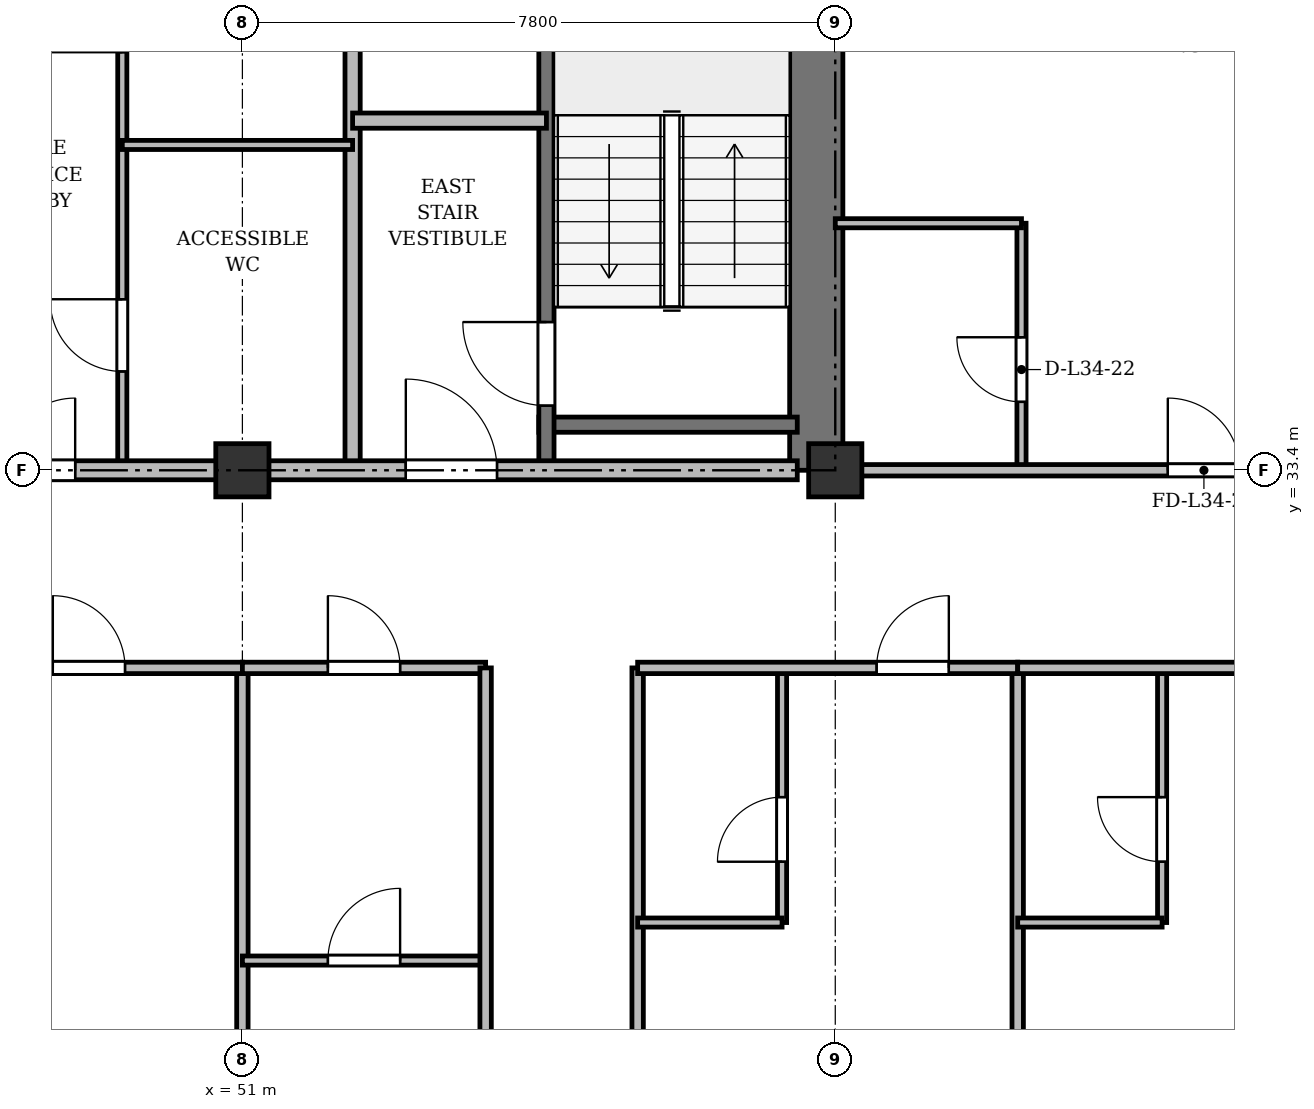
"""IFC4 building model, lengths in metres.
Left out: names, types, materials, properties, quantities, classifications, styles, units other than length and angle.
Written with IfcOpenShell. Run it as: python <this file> out.ifc"""

import sys

from ifc_helpers import new_model, si_unit, direction, frame, frame_2d, origin, origin_2d, place, context, subcontext, project, spatial, rectangle, extrude, source, transform, mapped, element, fill, save


model = new_model("IFC4")
c1 = context("Model", 3, precision=1e-05, world=origin(), true_north=direction((0.0, 1.0)))
c2 = subcontext(c1, "Body", "Model", "MODEL_VIEW")
j1 = project(units=[si_unit("LENGTHUNIT", "METRE"), si_unit("PLANEANGLEUNIT", "RADIAN")], contexts=[c1])
p1 = place(None, origin())
s1 = spatial("IfcSite", under=j1, at=p1, CompositionType="ELEMENT")
p2 = place(p1, origin())
s2 = spatial("IfcBuilding", under=s1, at=p2, CompositionType="ELEMENT")
p3 = place(p2, frame((0.0, 0.0, 132.1)))
s3 = spatial("IfcBuildingStorey", under=s2, at=p3, CompositionType="ELEMENT", Elevation=132.1)
m1 = source(origin(), c2, "Body", "SweptSolid", [
    extrude(rectangle(XDim=0.7, YDim=0.7, at=origin_2d()), origin(), (0.0, 0.0, 1.0), 3.6),
])
for number, where, z_axis, x_axis in (
    (1, (51.0, 33.4, 0.0), (0.0, 0.0, 1.0), (1.0, 0.0, 0.0)),
    (2, (58.8, 33.4, 0.0), (0.0, 0.0, 1.0), (1.0, 0.0, 0.0)),
):
    element("IfcColumn", number, at=place(p3, frame(where, z_axis=z_axis, x_axis=x_axis)), inside=s3, PredefinedType="COLUMN", context=c2, shape_type="MappedRepresentation", body=[
        mapped(m1, transform((0.0, 0.0, 0.0), x_axis=(1.0, 0.0, 0.0), y_axis=(0.0, 1.0, 0.0), z_axis=(0.0, 0.0, 1.0), scale=1.0)),
    ])
p4 = place(p3, frame((58.55, 33.4, 0.0), z_axis=(0.0, 0.0, 1.0), x_axis=(0.0, 1.0, 0.0)))
e3 = element("IfcWall", 3, at=p4, inside=s3, PredefinedType="SHEAR", context=c2, shape_type="SweptSolid", body=[
    extrude(rectangle(XDim=11.7, YDim=0.7, at=frame_2d((5.85, 0.0))), origin(), (0.0, 0.0, 1.0), 3.35),
])
p5 = place(p3, frame((54.9, 34.0, 0.0), z_axis=(0.0, 0.0, 1.0), x_axis=(1.0, 0.0, 0.0)))
e4 = element("IfcWall", 4, at=p5, inside=s3, PredefinedType="SHEAR", context=c2, shape_type="SweptSolid", body=[
    extrude(rectangle(XDim=3.4, YDim=0.2, at=frame_2d((1.7, 0.0))), origin(), (0.0, 0.0, 1.0), 3.35),
])
p6 = place(p3, frame((55.0, 33.4, 0.0), z_axis=(0.0, 0.0, 1.0), x_axis=(0.0, 1.0, 0.0)))
e5 = element("IfcWall", 5, at=p6, inside=s3, PredefinedType="SHEAR", context=c2, shape_type="SweptSolid", body=[
    extrude(rectangle(XDim=11.1, YDim=0.2, at=frame_2d((5.55, 0.0))), origin(), (0.0, 0.0, 1.0), 3.35),
])
p7 = place(p6, frame((0.85, 0.0, 0.0)))
e6 = element("IfcOpeningElement", 6, at=p7, cuts=e5, PredefinedType="OPENING", context=c2, shape_type="SweptSolid", body=[
    extrude(rectangle(XDim=1.1, YDim=2.15, at=frame_2d((0.55, 1.075))), frame((0.0, 0.11, 0.0), z_axis=(0.0, -1.0, 0.0), x_axis=(1.0, 0.0, 0.0)), (0.0, 0.0, 1.0), 0.22),
])
p8 = place(p3, frame((52.45, 33.4, 0.0), z_axis=(0.0, 0.0, 1.0), x_axis=(0.0, 1.0, 0.0)))
e7 = element("IfcWall", 7, at=p8, inside=s3, PredefinedType="PARTITIONING", context=c2, shape_type="SweptSolid", body=[
    extrude(rectangle(XDim=8.65, YDim=0.2, at=frame_2d((4.325, 0.0))), origin(), (0.0, 0.0, 1.0), 2.75),
])
p9 = place(p8, frame((6.2, 0.0, 0.0)))
e8 = element("IfcOpeningElement", 8, at=p9, cuts=e7, PredefinedType="OPENING", context=c2, shape_type="SweptSolid", body=[
    extrude(rectangle(XDim=0.95, YDim=2.15, at=frame_2d((0.475, 1.075))), frame((0.0, 0.11, 0.0), z_axis=(0.0, -1.0, 0.0), x_axis=(1.0, 0.0, 0.0)), (0.0, 0.0, 1.0), 0.22),
])
p10 = place(p3, frame((52.45, 38.0, 0.0), z_axis=(0.0, 0.0, 1.0), x_axis=(1.0, 0.0, 0.0)))
e9 = element("IfcWall", 9, at=p10, inside=s3, PredefinedType="PARTITIONING", context=c2, shape_type="SweptSolid", body=[
    extrude(rectangle(XDim=2.55, YDim=0.2, at=frame_2d((1.275, 0.0))), origin(), (0.0, 0.0, 1.0), 3.35),
])
p11 = place(p3, frame((49.42, 33.4, 0.0), z_axis=(0.0, 0.0, 1.0), x_axis=(0.0, 1.0, 0.0)))
e10 = element("IfcWall", 10, at=p11, inside=s3, PredefinedType="PARTITIONING", context=c2, shape_type="SweptSolid", body=[
    extrude(rectangle(XDim=8.6, YDim=0.12, at=frame_2d((4.3, 0.0))), origin(), (0.0, 0.0, 1.0), 2.75),
])
p12 = place(p11, frame((1.3, 0.0, 0.0)))
e11 = element("IfcOpeningElement", 11, at=p12, cuts=e10, PredefinedType="OPENING", context=c2, shape_type="SweptSolid", body=[
    extrude(rectangle(XDim=0.95, YDim=2.15, at=frame_2d((0.475, 1.075))), frame((0.0, 0.07, 0.0), z_axis=(0.0, -1.0, 0.0), x_axis=(1.0, 0.0, 0.0)), (0.0, 0.0, 1.0), 0.14),
])
p13 = place(p11, frame((5.5, 0.0, 0.0)))
e12 = element("IfcOpeningElement", 12, at=p13, cuts=e10, PredefinedType="OPENING", context=c2, shape_type="SweptSolid", body=[
    extrude(rectangle(XDim=0.95, YDim=2.15, at=frame_2d((0.475, 1.075))), frame((0.0, 0.07, 0.0), z_axis=(0.0, -1.0, 0.0), x_axis=(1.0, 0.0, 0.0)), (0.0, 0.0, 1.0), 0.14),
])
p14 = place(p3, frame((49.42, 37.68, 0.0), z_axis=(0.0, 0.0, 1.0), x_axis=(1.0, 0.0, 0.0)))
e13 = element("IfcWall", 13, at=p14, inside=s3, PredefinedType="PARTITIONING", context=c2, shape_type="SweptSolid", body=[
    extrude(rectangle(XDim=3.03, YDim=0.12, at=frame_2d((1.515, 0.0))), origin(), (0.0, 0.0, 1.0), 2.85),
])
p15 = place(p3, frame((47.15, 33.4, 0.0), z_axis=(0.0, 0.0, 1.0), x_axis=(1.0, 0.0, 0.0)))
e14 = element("IfcWall", 14, at=p15, inside=s3, PredefinedType="PARTITIONING", context=c2, shape_type="SweptSolid", body=[
    extrude(rectangle(XDim=11.15, YDim=0.25, at=frame_2d((5.575, 0.0))), origin(), (0.0, 0.0, 1.0), 2.75),
])
p16 = place(p15, frame((0.7, 0.0, 0.0)))
e15 = element("IfcOpeningElement", 15, at=p16, cuts=e14, PredefinedType="OPENING", context=c2, shape_type="SweptSolid", body=[
    extrude(rectangle(XDim=0.95, YDim=2.15, at=frame_2d((0.475, 1.075))), frame((0.0, 0.135, 0.0), z_axis=(0.0, -1.0, 0.0), x_axis=(1.0, 0.0, 0.0)), (0.0, 0.0, 1.0), 0.27),
])
p17 = place(p15, frame((6.0, 0.0, 0.0)))
e16 = element("IfcOpeningElement", 16, at=p17, cuts=e14, PredefinedType="OPENING", context=c2, shape_type="SweptSolid", body=[
    extrude(rectangle(XDim=1.2, YDim=2.15, at=frame_2d((0.6, 1.075))), frame((0.0, 0.135, 0.0), z_axis=(0.0, -1.0, 0.0), x_axis=(1.0, 0.0, 0.0)), (0.0, 0.0, 1.0), 0.27),
])
p18 = place(p3, frame((61.25, 33.4, 0.0), z_axis=(0.0, 0.0, 1.0), x_axis=(0.0, 1.0, 0.0)))
e17 = element("IfcWall", 17, at=p18, inside=s3, PredefinedType="PARTITIONING", context=c2, shape_type="SweptSolid", body=[
    extrude(rectangle(XDim=3.25, YDim=0.12, at=frame_2d((1.625, 0.0))), origin(), (0.0, 0.0, 1.0), 2.75),
])
p19 = place(p18, frame((0.9, 0.0, 0.0)))
e18 = element("IfcOpeningElement", 18, at=p19, cuts=e17, PredefinedType="OPENING", context=c2, shape_type="SweptSolid", body=[
    extrude(rectangle(XDim=0.85, YDim=2.1, at=frame_2d((0.425, 1.05))), frame((0.0, 0.07, 0.0), z_axis=(0.0, -1.0, 0.0), x_axis=(1.0, 0.0, 0.0)), (0.0, 0.0, 1.0), 0.14),
])
p20 = place(p3, frame((58.8, 36.65, 0.0), z_axis=(0.0, 0.0, 1.0), x_axis=(1.0, 0.0, 0.0)))
e19 = element("IfcWall", 19, at=p20, inside=s3, PredefinedType="PARTITIONING", context=c2, shape_type="SweptSolid", body=[
    extrude(rectangle(XDim=2.45, YDim=0.12, at=frame_2d((1.225, 0.0))), origin(), (0.0, 0.0, 1.0), 2.85),
])
p21 = place(p3, frame((58.8, 33.4, 0.0), z_axis=(0.0, 0.0, 1.0), x_axis=(1.0, 0.0, 0.0)))
e20 = element("IfcWall", 20, at=p21, inside=s3, PredefinedType="PARTITIONING", context=c2, shape_type="SweptSolid", body=[
    extrude(rectangle(XDim=7.55, YDim=0.15, at=frame_2d((3.775, 0.0))), origin(), (0.0, 0.0, 1.0), 2.75),
])
p22 = place(p21, frame((4.375, 0.0, 0.0)))
e21 = element("IfcOpeningElement", 21, at=p22, cuts=e20, PredefinedType="OPENING", context=c2, shape_type="SweptSolid", body=[
    extrude(rectangle(XDim=0.95, YDim=2.15, at=frame_2d((0.475, 1.075))), frame((0.0, 0.085, 0.0), z_axis=(0.0, -1.0, 0.0), x_axis=(1.0, 0.0, 0.0)), (0.0, 0.0, 1.0), 0.17),
])
p23 = place(p3, frame((51.0, 3.525, 0.0), z_axis=(0.0, 0.0, 1.0), x_axis=(0.0, 1.0, 0.0)))
e22 = element("IfcWall", 22, at=p23, inside=s3, PredefinedType="PARTITIONING", context=c2, shape_type="SweptSolid", body=[
    extrude(rectangle(XDim=27.275, YDim=0.15, at=frame_2d((13.638, 0.0))), origin(), (0.0, 0.0, 1.0), 2.85),
])
p24 = place(p3, frame((61.2, 3.525, 0.0), z_axis=(0.0, 0.0, 1.0), x_axis=(0.0, 1.0, 0.0)))
e23 = element("IfcWall", 23, at=p24, inside=s3, PredefinedType="PARTITIONING", context=c2, shape_type="SweptSolid", body=[
    extrude(rectangle(XDim=27.275, YDim=0.15, at=frame_2d((13.638, 0.0))), origin(), (0.0, 0.0, 1.0), 2.75),
])
p25 = place(p3, frame((43.8, 30.8, 0.0), z_axis=(0.0, 0.0, 1.0), x_axis=(1.0, 0.0, 0.0)))
e24 = element("IfcWall", 24, at=p25, inside=s3, PredefinedType="PARTITIONING", context=c2, shape_type="SweptSolid", body=[
    extrude(rectangle(XDim=7.2, YDim=0.15, at=frame_2d((3.6, 0.0))), origin(), (0.0, 0.0, 1.0), 2.85),
])
p26 = place(p25, frame((4.706, 0.0, 0.0)))
e25 = element("IfcOpeningElement", 25, at=p26, cuts=e24, PredefinedType="OPENING", context=c2, shape_type="SweptSolid", body=[
    extrude(rectangle(XDim=0.95, YDim=2.15, at=frame_2d((0.475, 1.075))), frame((0.0, 0.085, 0.0), z_axis=(0.0, -1.0, 0.0), x_axis=(1.0, 0.0, 0.0)), (0.0, 0.0, 1.0), 0.17),
])
p27 = place(p3, frame((51.0, 30.8, 0.0), z_axis=(0.0, 0.0, 1.0), x_axis=(1.0, 0.0, 0.0)))
e26 = element("IfcWall", 26, at=p27, inside=s3, PredefinedType="PARTITIONING", context=c2, shape_type="SweptSolid", body=[
    extrude(rectangle(XDim=3.2, YDim=0.15, at=frame_2d((1.6, 0.0))), origin(), (0.0, 0.0, 1.0), 2.85),
])
p28 = place(p27, frame((1.125, 0.0, 0.0)))
e27 = element("IfcOpeningElement", 27, at=p28, cuts=e26, PredefinedType="OPENING", context=c2, shape_type="SweptSolid", body=[
    extrude(rectangle(XDim=0.95, YDim=2.15, at=frame_2d((0.475, 1.075))), frame((0.0, 0.085, 0.0), z_axis=(0.0, -1.0, 0.0), x_axis=(1.0, 0.0, 0.0)), (0.0, 0.0, 1.0), 0.17),
])
p29 = place(p3, frame((51.0, 26.95, 0.0), z_axis=(0.0, 0.0, 1.0), x_axis=(1.0, 0.0, 0.0)))
e28 = element("IfcWall", 28, at=p29, inside=s3, PredefinedType="PARTITIONING", context=c2, shape_type="SweptSolid", body=[
    extrude(rectangle(XDim=3.2, YDim=0.12, at=frame_2d((1.6, 0.0))), origin(), (0.0, 0.0, 1.0), 2.85),
])
p30 = place(p29, frame((1.125, 0.0, 0.0)))
e29 = element("IfcOpeningElement", 29, at=p30, cuts=e28, PredefinedType="OPENING", context=c2, shape_type="SweptSolid", body=[
    extrude(rectangle(XDim=0.95, YDim=2.15, at=frame_2d((0.475, 1.075))), frame((0.0, 0.07, 0.0), z_axis=(0.0, -1.0, 0.0), x_axis=(1.0, 0.0, 0.0)), (0.0, 0.0, 1.0), 0.14),
])
for number, where, z_axis, x_axis in (
    (30, (54.2, 3.525, 0.0), (0.0, 0.0, 1.0), (0.0, 1.0, 0.0)),
    (31, (56.2, 3.525, 0.0), (0.0, 0.0, 1.0), (0.0, 1.0, 0.0)),
):
    element("IfcWall", number, at=place(p3, frame(where, z_axis=z_axis, x_axis=x_axis)), inside=s3, PredefinedType="PARTITIONING", context=c2, shape_type="SweptSolid", body=[
        extrude(rectangle(XDim=27.275, YDim=0.15, at=frame_2d((13.638, 0.0))), origin(), (0.0, 0.0, 1.0), 2.75),
    ])
p31 = place(p3, frame((58.1, 27.45, 0.0), z_axis=(0.0, 0.0, 1.0), x_axis=(0.0, 1.0, 0.0)))
e32 = element("IfcWall", 32, at=p31, inside=s3, PredefinedType="PARTITIONING", context=c2, shape_type="SweptSolid", body=[
    extrude(rectangle(XDim=3.35, YDim=0.12, at=frame_2d((1.675, 0.0))), origin(), (0.0, 0.0, 1.0), 3.35),
])
p32 = place(p31, frame((0.8, 0.0, 0.0)))
e33 = element("IfcOpeningElement", 33, at=p32, cuts=e32, PredefinedType="OPENING", context=c2, shape_type="SweptSolid", body=[
    extrude(rectangle(XDim=0.85, YDim=2.1, at=frame_2d((0.425, 1.05))), frame((0.0, 0.07, 0.0), z_axis=(0.0, -1.0, 0.0), x_axis=(1.0, 0.0, 0.0)), (0.0, 0.0, 1.0), 0.14),
])
p33 = place(p3, frame((56.2, 27.45, 0.0), z_axis=(0.0, 0.0, 1.0), x_axis=(1.0, 0.0, 0.0)))
e34 = element("IfcWall", 34, at=p33, inside=s3, PredefinedType="PARTITIONING", context=c2, shape_type="SweptSolid", body=[
    extrude(rectangle(XDim=1.9, YDim=0.12, at=frame_2d((0.95, 0.0))), origin(), (0.0, 0.0, 1.0), 3.35),
])
p34 = place(p3, frame((56.2, 30.8, 0.0), z_axis=(0.0, 0.0, 1.0), x_axis=(1.0, 0.0, 0.0)))
e35 = element("IfcWall", 35, at=p34, inside=s3, PredefinedType="PARTITIONING", context=c2, shape_type="SweptSolid", body=[
    extrude(rectangle(XDim=5.0, YDim=0.15, at=frame_2d((2.5, 0.0))), origin(), (0.0, 0.0, 1.0), 2.85),
])
p35 = place(p34, frame((3.144, 0.0, 0.0)))
e36 = element("IfcOpeningElement", 36, at=p35, cuts=e35, PredefinedType="OPENING", context=c2, shape_type="SweptSolid", body=[
    extrude(rectangle(XDim=0.95, YDim=2.15, at=frame_2d((0.475, 1.075))), frame((0.0, 0.085, 0.0), z_axis=(0.0, -1.0, 0.0), x_axis=(1.0, 0.0, 0.0)), (0.0, 0.0, 1.0), 0.17),
])
p36 = place(p3, frame((63.1, 27.45, 0.0), z_axis=(0.0, 0.0, 1.0), x_axis=(0.0, 1.0, 0.0)))
e37 = element("IfcWall", 37, at=p36, inside=s3, PredefinedType="PARTITIONING", context=c2, shape_type="SweptSolid", body=[
    extrude(rectangle(XDim=3.35, YDim=0.12, at=frame_2d((1.675, 0.0))), origin(), (0.0, 0.0, 1.0), 3.35),
])
p37 = place(p36, frame((0.8, 0.0, 0.0)))
e38 = element("IfcOpeningElement", 38, at=p37, cuts=e37, PredefinedType="OPENING", context=c2, shape_type="SweptSolid", body=[
    extrude(rectangle(XDim=0.85, YDim=2.1, at=frame_2d((0.425, 1.05))), frame((0.0, 0.07, 0.0), z_axis=(0.0, -1.0, 0.0), x_axis=(1.0, 0.0, 0.0)), (0.0, 0.0, 1.0), 0.14),
])
p38 = place(p3, frame((61.2, 27.45, 0.0), z_axis=(0.0, 0.0, 1.0), x_axis=(1.0, 0.0, 0.0)))
e39 = element("IfcWall", 39, at=p38, inside=s3, PredefinedType="PARTITIONING", context=c2, shape_type="SweptSolid", body=[
    extrude(rectangle(XDim=1.9, YDim=0.12, at=frame_2d((0.95, 0.0))), origin(), (0.0, 0.0, 1.0), 3.35),
])
p39 = place(p3, frame((61.2, 30.8, 0.0), z_axis=(0.0, 0.0, 1.0), x_axis=(1.0, 0.0, 0.0)))
e40 = element("IfcWall", 40, at=p39, inside=s3, PredefinedType="PARTITIONING", context=c2, shape_type="SweptSolid", body=[
    extrude(rectangle(XDim=5.175, YDim=0.15, at=frame_2d((2.587, 0.0))), origin(), (0.0, 0.0, 1.0), 2.85),
])
p40 = place(p39, frame((3.244, 0.0, 0.0)))
e41 = element("IfcOpeningElement", 41, at=p40, cuts=e40, PredefinedType="OPENING", context=c2, shape_type="SweptSolid", body=[
    extrude(rectangle(XDim=0.95, YDim=2.15, at=frame_2d((0.475, 1.075))), frame((0.0, 0.085, 0.0), z_axis=(0.0, -1.0, 0.0), x_axis=(1.0, 0.0, 0.0)), (0.0, 0.0, 1.0), 0.17),
])
m2 = source(origin(), c2, "Body", "SweptSolid", [
    extrude(rectangle(XDim=1.1, YDim=2.15, at=frame_2d((0.55, 1.075))), frame((0.0, 0.025, 0.0), z_axis=(0.0, -1.0, 0.0), x_axis=(1.0, 0.0, 0.0)), (0.0, 0.0, 1.0), 0.05),
])
p41 = place(p7, origin())
e42 = element("IfcDoor", 42, at=p41, inside=s3, OperationType="SINGLE_SWING_RIGHT", PredefinedType="DOOR", context=c2, shape_type="MappedRepresentation", body=[
    mapped(m2, transform((0.0, 0.0, 0.0), x_axis=(1.0, 0.0, 0.0), y_axis=(0.0, 1.0, 0.0), z_axis=(0.0, 0.0, 1.0), scale=1.0)),
])
fill(e6, e42)
m3 = source(origin(), c2, "Body", "SweptSolid", [
    extrude(rectangle(XDim=0.95, YDim=2.15, at=frame_2d((0.475, 1.075))), frame((0.0, 0.025, 0.0), z_axis=(0.0, -1.0, 0.0), x_axis=(1.0, 0.0, 0.0)), (0.0, 0.0, 1.0), 0.05),
])
p42 = place(p12, origin())
e43 = element("IfcDoor", 43, at=p42, inside=s3, OperationType="SINGLE_SWING_RIGHT", PredefinedType="DOOR", context=c2, shape_type="MappedRepresentation", body=[
    mapped(m3, transform((0.0, 0.0, 0.0), x_axis=(1.0, 0.0, 0.0), y_axis=(0.0, 1.0, 0.0), z_axis=(0.0, 0.0, 1.0), scale=1.0)),
])
fill(e11, e43)
p43 = place(p16, origin())
e44 = element("IfcDoor", 44, at=p43, inside=s3, OperationType="SINGLE_SWING_RIGHT", PredefinedType="DOOR", context=c2, shape_type="MappedRepresentation", body=[
    mapped(m3, transform((0.0, 0.0, 0.0), x_axis=(1.0, 0.0, 0.0), y_axis=(0.0, 1.0, 0.0), z_axis=(0.0, 0.0, 1.0), scale=1.0)),
])
fill(e15, e44)
m4 = source(origin(), c2, "Body", "SweptSolid", [
    extrude(rectangle(XDim=1.2, YDim=2.15, at=frame_2d((0.6, 1.075))), frame((0.0, 0.025, 0.0), z_axis=(0.0, -1.0, 0.0), x_axis=(1.0, 0.0, 0.0)), (0.0, 0.0, 1.0), 0.05),
])
p44 = place(p17, origin())
e45 = element("IfcDoor", 45, at=p44, inside=s3, OperationType="SINGLE_SWING_LEFT", PredefinedType="DOOR", context=c2, shape_type="MappedRepresentation", body=[
    mapped(m4, transform((0.0, 0.0, 0.0), x_axis=(1.0, 0.0, 0.0), y_axis=(0.0, 1.0, 0.0), z_axis=(0.0, 0.0, 1.0), scale=1.0)),
])
fill(e16, e45)
m5 = source(origin(), c2, "Body", "SweptSolid", [
    extrude(rectangle(XDim=0.85, YDim=2.1, at=frame_2d((0.425, 1.05))), frame((0.0, 0.025, 0.0), z_axis=(0.0, -1.0, 0.0), x_axis=(1.0, 0.0, 0.0)), (0.0, 0.0, 1.0), 0.05),
])
p45 = place(p19, origin())
e46 = element("IfcDoor", 46, at=p45, inside=s3, OperationType="SINGLE_SWING_RIGHT", PredefinedType="DOOR", context=c2, shape_type="MappedRepresentation", body=[
    mapped(m5, transform((0.0, 0.0, 0.0), x_axis=(1.0, 0.0, 0.0), y_axis=(0.0, 1.0, 0.0), z_axis=(0.0, 0.0, 1.0), scale=1.0)),
])
fill(e18, e46)
p46 = place(p22, origin())
e47 = element("IfcDoor", 47, at=p46, inside=s3, OperationType="SINGLE_SWING_LEFT", PredefinedType="DOOR", context=c2, shape_type="MappedRepresentation", body=[
    mapped(m3, transform((0.0, 0.0, 0.0), x_axis=(1.0, 0.0, 0.0), y_axis=(0.0, 1.0, 0.0), z_axis=(0.0, 0.0, 1.0), scale=1.0)),
])
fill(e21, e47)
p47 = place(p26, origin())
e48 = element("IfcDoor", 48, at=p47, inside=s3, OperationType="SINGLE_SWING_LEFT", PredefinedType="DOOR", context=c2, shape_type="MappedRepresentation", body=[
    mapped(m3, transform((0.0, 0.0, 0.0), x_axis=(1.0, 0.0, 0.0), y_axis=(0.0, 1.0, 0.0), z_axis=(0.0, 0.0, 1.0), scale=1.0)),
])
fill(e25, e48)
p48 = place(p28, origin())
e49 = element("IfcDoor", 49, at=p48, inside=s3, OperationType="SINGLE_SWING_LEFT", PredefinedType="DOOR", context=c2, shape_type="MappedRepresentation", body=[
    mapped(m3, transform((0.0, 0.0, 0.0), x_axis=(1.0, 0.0, 0.0), y_axis=(0.0, 1.0, 0.0), z_axis=(0.0, 0.0, 1.0), scale=1.0)),
])
fill(e27, e49)
p49 = place(p30, origin())
e50 = element("IfcDoor", 50, at=p49, inside=s3, OperationType="SINGLE_SWING_RIGHT", PredefinedType="DOOR", context=c2, shape_type="MappedRepresentation", body=[
    mapped(m3, transform((0.0, 0.0, 0.0), x_axis=(1.0, 0.0, 0.0), y_axis=(0.0, 1.0, 0.0), z_axis=(0.0, 0.0, 1.0), scale=1.0)),
])
fill(e29, e50)
p50 = place(p32, origin())
e51 = element("IfcDoor", 51, at=p50, inside=s3, OperationType="SINGLE_SWING_LEFT", PredefinedType="DOOR", context=c2, shape_type="MappedRepresentation", body=[
    mapped(m5, transform((0.0, 0.0, 0.0), x_axis=(1.0, 0.0, 0.0), y_axis=(0.0, 1.0, 0.0), z_axis=(0.0, 0.0, 1.0), scale=1.0)),
])
fill(e33, e51)
p51 = place(p35, origin())
e52 = element("IfcDoor", 52, at=p51, inside=s3, OperationType="SINGLE_SWING_RIGHT", PredefinedType="DOOR", context=c2, shape_type="MappedRepresentation", body=[
    mapped(m3, transform((0.0, 0.0, 0.0), x_axis=(1.0, 0.0, 0.0), y_axis=(0.0, 1.0, 0.0), z_axis=(0.0, 0.0, 1.0), scale=1.0)),
])
fill(e36, e52)
p52 = place(p37, origin())
e53 = element("IfcDoor", 53, at=p52, inside=s3, OperationType="SINGLE_SWING_RIGHT", PredefinedType="DOOR", context=c2, shape_type="MappedRepresentation", body=[
    mapped(m5, transform((0.0, 0.0, 0.0), x_axis=(1.0, 0.0, 0.0), y_axis=(0.0, 1.0, 0.0), z_axis=(0.0, 0.0, 1.0), scale=1.0)),
])
fill(e38, e53)
save(model, sys.argv[1])
